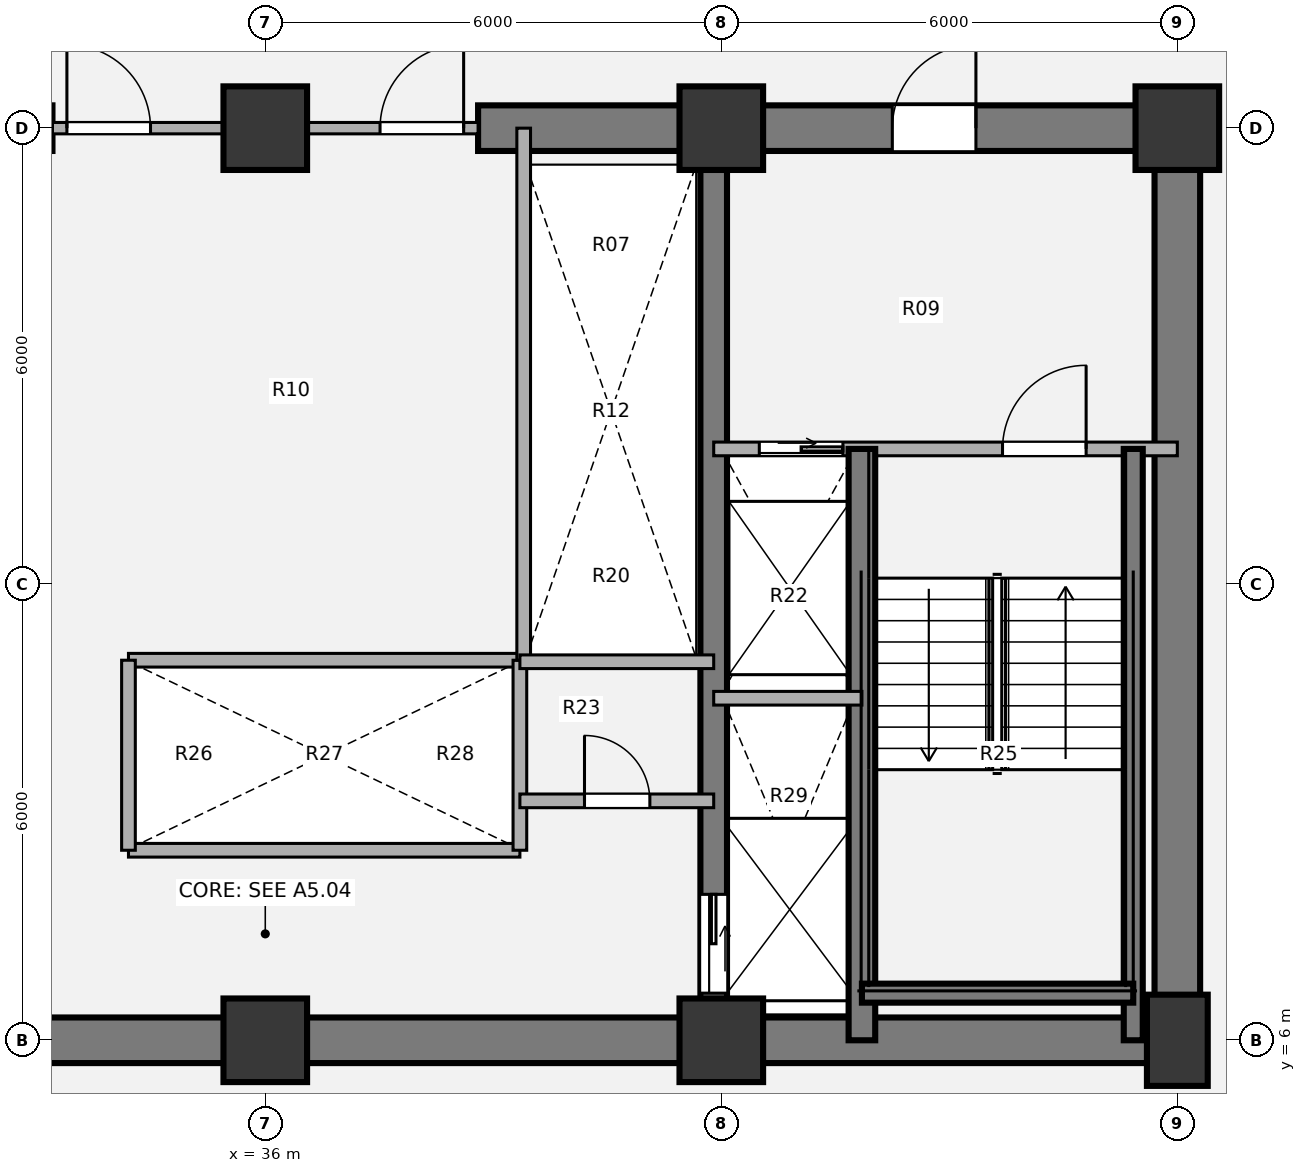
"""IFC4 building model, lengths in metres.
Left out: names, types, materials, properties, quantities, classifications, styles, units other than length and angle.
Written with IfcOpenShell. Run it as: python <this file> out.ifc"""

import sys

from ifc_helpers import new_model, si_unit, direction, frame, frame_2d, origin, origin_2d, place, context, subcontext, project, spatial, rectangle, extrude, source, transform, mapped, element, fill, save


model = new_model("IFC4")
c1 = context("Model", 3, precision=1e-05, world=origin(), true_north=direction((0.0, 1.0)))
c2 = subcontext(c1, "Body", "Model", "MODEL_VIEW")
j1 = project(units=[si_unit("LENGTHUNIT", "METRE"), si_unit("PLANEANGLEUNIT", "RADIAN")], contexts=[c1])
p1 = place(None, origin())
s1 = spatial("IfcSite", under=j1, at=p1, CompositionType="ELEMENT")
p2 = place(p1, origin())
s2 = spatial("IfcBuilding", under=s1, at=p2, CompositionType="ELEMENT")
p3 = place(p2, frame((0.0, 0.0, 45.9)))
s3 = spatial("IfcBuildingStorey", under=s2, at=p3, CompositionType="ELEMENT", Elevation=45.9)
m1 = source(origin(), c2, "Body", "SweptSolid", [
    extrude(rectangle(XDim=1.1, YDim=1.1, at=origin_2d()), origin(), (0.0, 0.0, 1.0), 3.78),
])
for number, where, z_axis, x_axis in (
    (1, (36.0, 6.0, 0.0), (0.0, 0.0, 1.0), (1.0, 0.0, 0.0)),
    (2, (42.0, 6.0, 0.0), (0.0, 0.0, 1.0), (1.0, 0.0, 0.0)),
):
    element("IfcColumn", number, at=place(p3, frame(where, z_axis=z_axis, x_axis=x_axis)), inside=s3, PredefinedType="COLUMN", context=c2, shape_type="MappedRepresentation", body=[
        mapped(m1, transform((0.0, 0.0, 0.0), x_axis=(1.0, 0.0, 0.0), y_axis=(0.0, 1.0, 0.0), z_axis=(0.0, 0.0, 1.0), scale=1.0)),
    ])
m2 = source(origin(), c2, "Body", "SweptSolid", [
    extrude(rectangle(XDim=0.8, YDim=1.2, at=origin_2d()), origin(), (0.0, 0.0, 1.0), 3.78),
])
p4 = place(p3, frame((48.0, 6.0, 0.0), z_axis=(0.0, 0.0, 1.0), x_axis=(1.0, 0.0, 0.0)))
e3 = element("IfcColumn", 3, at=p4, inside=s3, PredefinedType="COLUMN", context=c2, shape_type="MappedRepresentation", body=[
    mapped(m2, transform((0.0, 0.0, 0.0), x_axis=(1.0, 0.0, 0.0), y_axis=(0.0, 1.0, 0.0), z_axis=(0.0, 0.0, 1.0), scale=1.0)),
])
for number, where, z_axis, x_axis in (
    (4, (36.0, 18.0, 0.0), (0.0, 0.0, 1.0), (1.0, 0.0, 0.0)),
    (5, (42.0, 18.0, 0.0), (0.0, 0.0, 1.0), (1.0, 0.0, 0.0)),
    (6, (48.0, 18.0, 0.0), (0.0, 0.0, 1.0), (1.0, 0.0, 0.0)),
):
    element("IfcColumn", number, at=place(p3, frame(where, z_axis=z_axis, x_axis=x_axis)), inside=s3, PredefinedType="COLUMN", context=c2, shape_type="MappedRepresentation", body=[
        mapped(m1, transform((0.0, 0.0, 0.0), x_axis=(1.0, 0.0, 0.0), y_axis=(0.0, 1.0, 0.0), z_axis=(0.0, 0.0, 1.0), scale=1.0)),
    ])
p5 = place(p3, frame((48.3, 6.0, 0.0), z_axis=(0.0, 0.0, 1.0), x_axis=(-1.0, 0.0, 0.0)))
e7 = element("IfcWall", 7, at=p5, inside=s3, PredefinedType="SHEAR", context=c2, shape_type="SweptSolid", body=[
    extrude(rectangle(XDim=24.6, YDim=0.6, at=frame_2d((12.3, 0.0))), origin(), (0.0, 0.0, 1.0), 3.78),
])
p6 = place(p3, frame((48.0, 18.0, 0.0), z_axis=(0.0, 0.0, 1.0), x_axis=(0.0, -1.0, 0.0)))
e8 = element("IfcWall", 8, at=p6, inside=s3, PredefinedType="SHEAR", context=c2, shape_type="SweptSolid", body=[
    extrude(rectangle(XDim=12.0, YDim=0.6, at=frame_2d((6.0, 0.0))), origin(), (0.0, 0.0, 1.0), 3.78),
])
p7 = place(p3, frame((38.8, 18.0, 0.0), z_axis=(0.0, 0.0, 1.0), x_axis=(1.0, 0.0, 0.0)))
e9 = element("IfcWall", 9, at=p7, inside=s3, PredefinedType="SHEAR", context=c2, shape_type="SweptSolid", body=[
    extrude(rectangle(XDim=9.5, YDim=0.6, at=frame_2d((4.75, 0.0))), origin(), (0.0, 0.0, 1.0), 3.78),
])
p8 = place(p7, frame((5.45, 0.0, 0.0)))
e10 = element("IfcOpeningElement", 10, at=p8, cuts=e9, PredefinedType="OPENING", context=c2, shape_type="SweptSolid", body=[
    extrude(rectangle(XDim=1.1, YDim=2.1, at=origin_2d()), frame((0.55, 0.31, 1.05), z_axis=(0.0, -1.0, 0.0), x_axis=(1.0, 0.0, 0.0)), (0.0, 0.0, 1.0), 0.62),
])
p9 = place(p3, frame((41.9, 18.0, 0.0), z_axis=(0.0, 0.0, 1.0), x_axis=(0.0, -1.0, 0.0)))
e11 = element("IfcWall", 11, at=p9, inside=s3, PredefinedType="SHEAR", context=c2, shape_type="SweptSolid", body=[
    extrude(rectangle(XDim=12.0, YDim=0.35, at=frame_2d((6.0, 0.0))), origin(), (0.0, 0.0, 1.0), 3.78),
])
p10 = place(p9, frame((10.08, 0.0, 0.0)))
e12 = element("IfcOpeningElement", 12, at=p10, cuts=e11, PredefinedType="OPENING", context=c2, shape_type="SweptSolid", body=[
    extrude(rectangle(XDim=1.3, YDim=2.1, at=origin_2d()), frame((0.65, 0.185, 1.05), z_axis=(0.0, -1.0, 0.0), x_axis=(1.0, 0.0, 0.0)), (0.0, 0.0, 1.0), 0.37),
])
for number, where, z_axis, x_axis in (
    (13, (34.2, 11.0, 0.0), (0.0, 0.0, 1.0), (1.0, 0.0, 0.0)),
    (14, (34.2, 8.5, 0.0), (0.0, 0.0, 1.0), (1.0, 0.0, 0.0)),
):
    element("IfcWall", number, at=place(p3, frame(where, z_axis=z_axis, x_axis=x_axis)), inside=s3, PredefinedType="PARTITIONING", context=c2, shape_type="SweptSolid", body=[
        extrude(rectangle(XDim=5.15, YDim=0.18, at=frame_2d((2.575, 0.0))), origin(), (0.0, 0.0, 1.0), 3.5),
    ])
for number, where, z_axis, x_axis in (
    (15, (34.2, 8.5, 0.0), (0.0, 0.0, 1.0), (0.0, 1.0, 0.0)),
    (16, (39.35, 8.5, 0.0), (0.0, 0.0, 1.0), (0.0, 1.0, 0.0)),
):
    element("IfcWall", number, at=place(p3, frame(where, z_axis=z_axis, x_axis=x_axis)), inside=s3, PredefinedType="PARTITIONING", context=c2, shape_type="SweptSolid", body=[
        extrude(rectangle(XDim=2.5, YDim=0.18, at=frame_2d((1.25, 0.0))), origin(), (0.0, 0.0, 1.0), 3.5),
    ])
p11 = place(p3, frame((39.4, 11.0, 0.0), z_axis=(0.0, 0.0, 1.0), x_axis=(0.0, 1.0, 0.0)))
e17 = element("IfcWall", 17, at=p11, inside=s3, PredefinedType="PARTITIONING", context=c2, shape_type="SweptSolid", body=[
    extrude(rectangle(XDim=7.0, YDim=0.18, at=frame_2d((3.5, 0.0))), origin(), (0.0, 0.0, 1.0), 3.5),
])
p12 = place(p3, frame((39.35, 10.98, 0.0), z_axis=(0.0, 0.0, 1.0), x_axis=(1.0, 0.0, 0.0)))
e18 = element("IfcWall", 18, at=p12, inside=s3, PredefinedType="PARTITIONING", context=c2, shape_type="SweptSolid", body=[
    extrude(rectangle(XDim=2.55, YDim=0.18, at=frame_2d((1.275, 0.0))), origin(), (0.0, 0.0, 1.0), 3.5),
])
p13 = place(p3, frame((39.35, 9.15, 0.0), z_axis=(0.0, 0.0, 1.0), x_axis=(1.0, 0.0, 0.0)))
e19 = element("IfcWall", 19, at=p13, inside=s3, PredefinedType="PARTITIONING", context=c2, shape_type="SweptSolid", body=[
    extrude(rectangle(XDim=2.55, YDim=0.18, at=frame_2d((1.275, 0.0))), origin(), (0.0, 0.0, 1.0), 3.5),
])
p14 = place(p13, frame((0.85, 0.0, 0.0)))
e20 = element("IfcOpeningElement", 20, at=p14, cuts=e19, PredefinedType="OPENING", context=c2, shape_type="SweptSolid", body=[
    extrude(rectangle(XDim=0.86, YDim=2.1, at=origin_2d()), frame((0.43, 0.1, 1.05), z_axis=(0.0, -1.0, 0.0), x_axis=(1.0, 0.0, 0.0)), (0.0, 0.0, 1.0), 0.2),
])
p15 = place(p3, frame((33.2, 18.0, 0.0), z_axis=(0.0, 0.0, 1.0), x_axis=(1.0, 0.0, 0.0)))
e21 = element("IfcWall", 21, at=p15, inside=s3, PredefinedType="PARTITIONING", context=c2, shape_type="SweptSolid", body=[
    extrude(rectangle(XDim=5.6, YDim=0.15, at=frame_2d((2.8, 0.0))), origin(), (0.0, 0.0, 1.0), 2.315),
])
p16 = place(p15, frame((0.19, 0.0, 0.0)))
e22 = element("IfcOpeningElement", 22, at=p16, cuts=e21, PredefinedType="OPENING", context=c2, shape_type="SweptSolid", body=[
    extrude(rectangle(XDim=1.1, YDim=2.1, at=origin_2d()), frame((0.55, 0.085, 1.05), z_axis=(0.0, -1.0, 0.0), x_axis=(1.0, 0.0, 0.0)), (0.0, 0.0, 1.0), 0.17),
])
p17 = place(p15, frame((4.31, 0.0, 0.0)))
e23 = element("IfcOpeningElement", 23, at=p17, cuts=e21, PredefinedType="OPENING", context=c2, shape_type="SweptSolid", body=[
    extrude(rectangle(XDim=1.1, YDim=2.1, at=origin_2d()), frame((0.55, 0.085, 1.05), z_axis=(0.0, -1.0, 0.0), x_axis=(1.0, 0.0, 0.0)), (0.0, 0.0, 1.0), 0.17),
])
p18 = place(p3, frame((41.9, 13.78, 0.0), z_axis=(0.0, 0.0, 1.0), x_axis=(1.0, 0.0, 0.0)))
e24 = element("IfcWall", 24, at=p18, inside=s3, PredefinedType="PARTITIONING", context=c2, shape_type="SweptSolid", body=[
    extrude(rectangle(XDim=6.1, YDim=0.18, at=frame_2d((3.05, 0.0))), origin(), (0.0, 0.0, 1.0), 3.5),
])
p19 = place(p18, frame((0.6, 0.0, 0.0)))
e25 = element("IfcOpeningElement", 25, at=p19, cuts=e24, PredefinedType="OPENING", context=c2, shape_type="SweptSolid", body=[
    extrude(rectangle(XDim=1.1, YDim=2.1, at=origin_2d()), frame((0.55, 0.1, 1.05), z_axis=(0.0, -1.0, 0.0), x_axis=(1.0, 0.0, 0.0)), (0.0, 0.0, 1.0), 0.2),
])
p20 = place(p18, frame((3.8, 0.0, 0.0)))
e26 = element("IfcOpeningElement", 26, at=p20, cuts=e24, PredefinedType="OPENING", context=c2, shape_type="SweptSolid", body=[
    extrude(rectangle(XDim=1.1, YDim=2.1, at=origin_2d()), frame((0.55, 0.1, 1.05), z_axis=(0.0, -1.0, 0.0), x_axis=(1.0, 0.0, 0.0)), (0.0, 0.0, 1.0), 0.2),
])
p21 = place(p3, frame((43.85, 6.0, 0.0), z_axis=(0.0, 0.0, 1.0), x_axis=(0.0, 1.0, 0.0)))
e27 = element("IfcWall", 27, at=p21, inside=s3, PredefinedType="SHEAR", context=c2, shape_type="SweptSolid", body=[
    extrude(rectangle(XDim=7.78, YDim=0.35, at=frame_2d((3.89, 0.0))), origin(), (0.0, 0.0, 1.0), 3.85),
])
p22 = place(p3, frame((47.42, 6.0, 0.0), z_axis=(0.0, 0.0, 1.0), x_axis=(0.0, 1.0, 0.0)))
e28 = element("IfcWall", 28, at=p22, inside=s3, PredefinedType="SHEAR", context=c2, shape_type="SweptSolid", body=[
    extrude(rectangle(XDim=7.78, YDim=0.25, at=frame_2d((3.89, 0.0))), origin(), (0.0, 0.0, 1.0), 3.85),
])
p23 = place(p3, frame((43.85, 6.62, 0.0), z_axis=(0.0, 0.0, 1.0), x_axis=(1.0, 0.0, 0.0)))
e29 = element("IfcWall", 29, at=p23, inside=s3, PredefinedType="SHEAR", context=c2, shape_type="SweptSolid", body=[
    extrude(rectangle(XDim=3.57, YDim=0.25, at=frame_2d((1.785, 0.0))), origin(), (0.0, 0.0, 1.0), 3.85),
])
p24 = place(p3, frame((41.9, 10.5, 0.0), z_axis=(0.0, 0.0, 1.0), x_axis=(1.0, 0.0, 0.0)))
e30 = element("IfcWall", 30, at=p24, inside=s3, PredefinedType="PARTITIONING", context=c2, shape_type="SweptSolid", body=[
    extrude(rectangle(XDim=1.95, YDim=0.18, at=frame_2d((0.975, 0.0))), origin(), (0.0, 0.0, 1.0), 3.5),
])
m3 = source(origin(), c2, "Body", "SweptSolid", [
    extrude(rectangle(XDim=0.86, YDim=2.1, at=origin_2d()), frame((0.43, 0.025, 1.05), z_axis=(0.0, -1.0, 0.0), x_axis=(1.0, 0.0, 0.0)), (0.0, 0.0, 1.0), 0.05),
])
p25 = place(p14, origin())
e31 = element("IfcDoor", 31, at=p25, inside=s3, OperationType="SINGLE_SWING_LEFT", PredefinedType="DOOR", context=c2, shape_type="MappedRepresentation", body=[
    mapped(m3, transform((0.0, 0.0, 0.0), x_axis=(1.0, 0.0, 0.0), y_axis=(0.0, 1.0, 0.0), z_axis=(0.0, 0.0, 1.0), scale=1.0)),
])
fill(e20, e31)
m4 = source(origin(), c2, "Body", "SweptSolid", [
    extrude(rectangle(XDim=1.1, YDim=2.1, at=origin_2d()), frame((0.55, 0.025, 1.05), z_axis=(0.0, -1.0, 0.0), x_axis=(1.0, 0.0, 0.0)), (0.0, 0.0, 1.0), 0.05),
])
p26 = place(p16, origin())
e32 = element("IfcDoor", 32, at=p26, inside=s3, OperationType="SINGLE_SWING_LEFT", PredefinedType="DOOR", context=c2, shape_type="MappedRepresentation", body=[
    mapped(m4, transform((0.0, 0.0, 0.0), x_axis=(1.0, 0.0, 0.0), y_axis=(0.0, 1.0, 0.0), z_axis=(0.0, 0.0, 1.0), scale=1.0)),
])
fill(e22, e32)
p27 = place(p17, origin())
e33 = element("IfcDoor", 33, at=p27, inside=s3, OperationType="SINGLE_SWING_RIGHT", PredefinedType="DOOR", context=c2, shape_type="MappedRepresentation", body=[
    mapped(m4, transform((0.0, 0.0, 0.0), x_axis=(1.0, 0.0, 0.0), y_axis=(0.0, 1.0, 0.0), z_axis=(0.0, 0.0, 1.0), scale=1.0)),
])
fill(e23, e33)
m5 = source(origin(), c2, "Body", "SweptSolid", [
    extrude(rectangle(XDim=1.1, YDim=2.1, at=origin_2d()), frame((0.55, 0.025, 1.05), z_axis=(0.0, -1.0, 0.0), x_axis=(1.0, 0.0, 0.0)), (0.0, 0.0, 1.0), 0.05),
])
p28 = place(p19, origin())
e34 = element("IfcDoor", 34, at=p28, inside=s3, OperationType="SLIDING_TO_RIGHT", PredefinedType="DOOR", context=c2, shape_type="MappedRepresentation", body=[
    mapped(m5, transform((0.0, 0.0, 0.0), x_axis=(1.0, 0.0, 0.0), y_axis=(0.0, 1.0, 0.0), z_axis=(0.0, 0.0, 1.0), scale=1.0)),
])
fill(e25, e34)
m6 = source(origin(), c2, "Body", "SweptSolid", [
    extrude(rectangle(XDim=1.1, YDim=2.1, at=origin_2d()), frame((0.55, 0.025, 1.05), z_axis=(0.0, -1.0, 0.0), x_axis=(1.0, 0.0, 0.0)), (0.0, 0.0, 1.0), 0.05),
])
p29 = place(p20, origin())
e35 = element("IfcDoor", 35, at=p29, inside=s3, OperationType="SINGLE_SWING_RIGHT", PredefinedType="DOOR", context=c2, shape_type="MappedRepresentation", body=[
    mapped(m6, transform((0.0, 0.0, 0.0), x_axis=(1.0, 0.0, 0.0), y_axis=(0.0, 1.0, 0.0), z_axis=(0.0, 0.0, 1.0), scale=1.0)),
])
fill(e26, e35)
m7 = source(origin(), c2, "Body", "SweptSolid", [
    extrude(rectangle(XDim=1.3, YDim=2.1, at=origin_2d()), frame((0.65, 0.025, 1.05), z_axis=(0.0, -1.0, 0.0), x_axis=(1.0, 0.0, 0.0)), (0.0, 0.0, 1.0), 0.05),
])
p30 = place(p10, origin())
e36 = element("IfcDoor", 36, at=p30, inside=s3, OperationType="SLIDING_TO_LEFT", PredefinedType="DOOR", context=c2, shape_type="MappedRepresentation", body=[
    mapped(m7, transform((0.0, 0.0, 0.0), x_axis=(1.0, 0.0, 0.0), y_axis=(0.0, 1.0, 0.0), z_axis=(0.0, 0.0, 1.0), scale=1.0)),
])
fill(e12, e36)
p31 = place(p8, origin())
e37 = element("IfcDoor", 37, at=p31, inside=s3, OperationType="SINGLE_SWING_RIGHT", PredefinedType="DOOR", context=c2, shape_type="MappedRepresentation", body=[
    mapped(m4, transform((0.0, 0.0, 0.0), x_axis=(1.0, 0.0, 0.0), y_axis=(0.0, 1.0, 0.0), z_axis=(0.0, 0.0, 1.0), scale=1.0)),
])
fill(e10, e37)
save(model, sys.argv[1])
